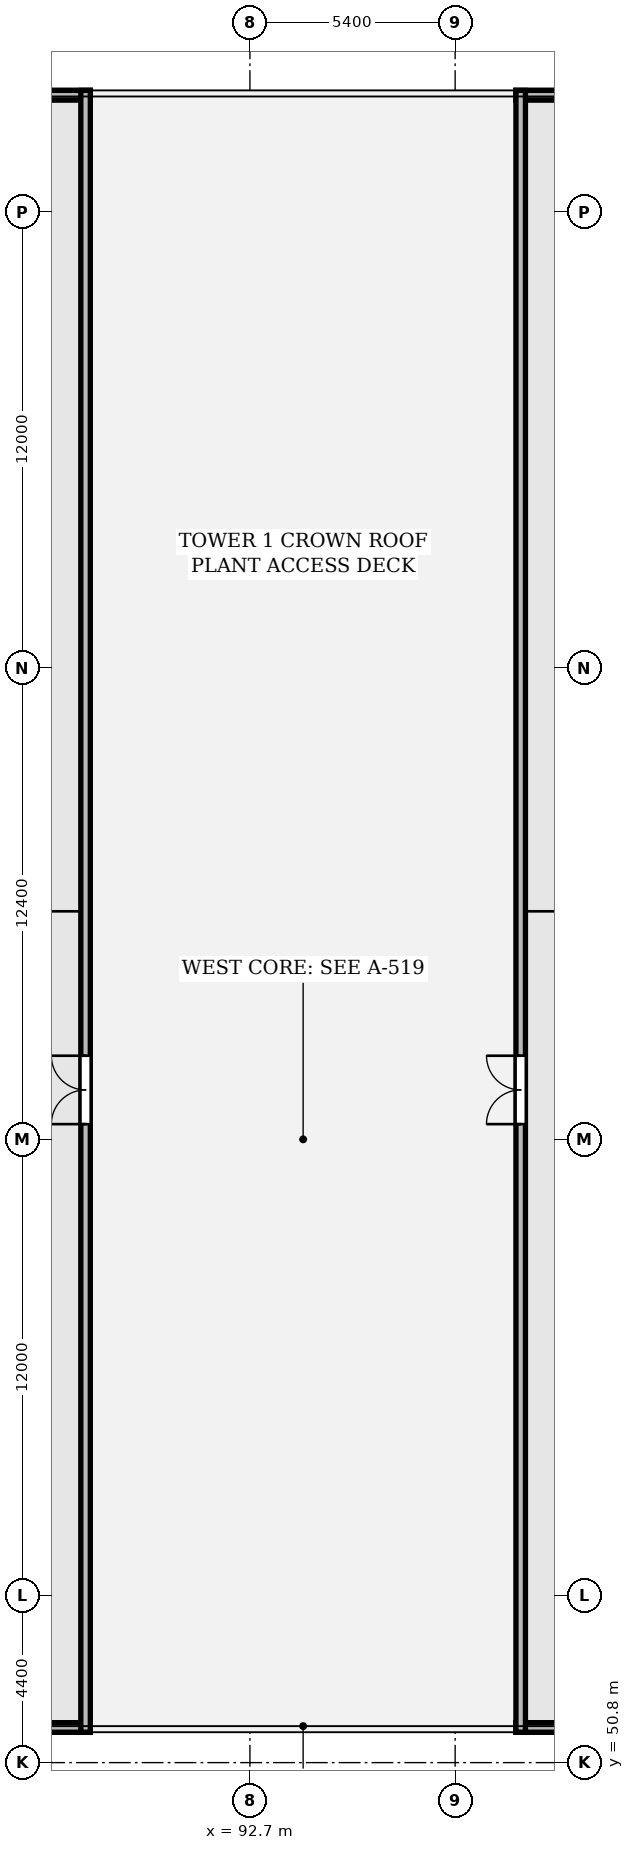
"""IFC4 building model, lengths in metres.
Left out: names, types, materials, properties, quantities, classifications, styles, units other than length and angle.
Written with IfcOpenShell. Run it as: python <this file> out.ifc"""

import sys

from ifc_helpers import new_model, si_unit, direction, frame, frame_2d, origin, place, context, subcontext, project, spatial, rectangle, extrude, element, fill, save


model = new_model("IFC4")
c1 = context("Model", 3, precision=1e-05, world=origin(), true_north=direction((0.0, 1.0)))
c2 = subcontext(c1, "Body", "Model", "MODEL_VIEW")
j1 = project(units=[si_unit("LENGTHUNIT", "METRE"), si_unit("PLANEANGLEUNIT", "RADIAN")], contexts=[c1])
p1 = place(None, origin())
s1 = spatial("IfcSite", under=j1, at=p1, CompositionType="ELEMENT")
p2 = place(p1, origin())
s2 = spatial("IfcBuilding", under=s1, at=p2, CompositionType="ELEMENT")
p3 = place(p2, frame((0.0, 0.0, 264.2)))
s3 = spatial("IfcBuildingStorey", under=s2, at=p3, CompositionType="ELEMENT", Elevation=264.2)
p4 = place(p3, frame((56.2, 51.725, 0.0), z_axis=(0.0, 0.0, 1.0), x_axis=(1.0, 0.0, 0.0)))
e1 = element("IfcWall", 1, at=p4, inside=s3, PredefinedType="SHEAR", context=c2, shape_type="SweptSolid", body=[
    extrude(rectangle(XDim=32.3, YDim=0.25, at=frame_2d((16.15, 0.0))), origin(), (0.0, 0.0, 1.0), 8.15),
])
p5 = place(p3, frame((85.5, 51.725, 8.15), z_axis=(0.0, 0.0, 1.0), x_axis=(1.0, 0.0, 0.0)))
e2 = element("IfcWall", 2, at=p5, inside=s3, PredefinedType="SHEAR", context=c2, shape_type="SweptSolid", body=[
    extrude(rectangle(XDim=3.0, YDim=0.25, at=frame_2d((1.5, 0.0))), origin(), (0.0, 0.0, 1.0), 3.8),
])
p6 = place(p3, frame((88.5, 94.675, 0.0), z_axis=(0.0, 0.0, 1.0), x_axis=(-1.0, 0.0, 0.0)))
e3 = element("IfcWall", 3, at=p6, inside=s3, PredefinedType="SHEAR", context=c2, shape_type="SweptSolid", body=[
    extrude(rectangle(XDim=32.3, YDim=0.25, at=frame_2d((16.15, 0.0))), origin(), (0.0, 0.0, 1.0), 8.15),
])
p7 = place(p3, frame((88.5, 94.675, 8.15), z_axis=(0.0, 0.0, 1.0), x_axis=(-1.0, 0.0, 0.0)))
e4 = element("IfcWall", 4, at=p7, inside=s3, PredefinedType="SHEAR", context=c2, shape_type="SweptSolid", body=[
    extrude(rectangle(XDim=3.0, YDim=0.25, at=frame_2d((1.5, 0.0))), origin(), (0.0, 0.0, 1.0), 3.8),
])
p8 = place(p3, frame((88.375, 51.6, 0.0), z_axis=(0.0, 0.0, 1.0), x_axis=(0.0, 1.0, 0.0)))
e5 = element("IfcWall", 5, at=p8, inside=s3, PredefinedType="SHEAR", context=c2, shape_type="SweptSolid", body=[
    extrude(rectangle(XDim=43.2, YDim=0.25, at=frame_2d((21.6, 0.0))), origin(), (0.0, 0.0, 1.0), 11.95),
])
p9 = place(p8, frame((16.0, 0.0, 0.0)))
e6 = element("IfcOpeningElement", 6, at=p9, cuts=e5, PredefinedType="OPENING", context=c2, shape_type="SweptSolid", body=[
    extrude(rectangle(XDim=1.8, YDim=2.2, at=frame_2d((0.9, 1.1))), frame((0.0, 0.135, 0.0), z_axis=(0.0, -1.0, 0.0), x_axis=(1.0, 0.0, 0.0)), (0.0, 0.0, 1.0), 0.27),
])
p10 = place(p3, frame((99.7, 51.725, 0.0), z_axis=(0.0, 0.0, 1.0), x_axis=(1.0, 0.0, 0.0)))
e7 = element("IfcWall", 7, at=p10, inside=s3, PredefinedType="SHEAR", context=c2, shape_type="SweptSolid", body=[
    extrude(rectangle(XDim=32.3, YDim=0.25, at=frame_2d((16.15, 0.0))), origin(), (0.0, 0.0, 1.0), 12.95),
])
p11 = place(p3, frame((99.7, 51.725, 12.95), z_axis=(0.0, 0.0, 1.0), x_axis=(1.0, 0.0, 0.0)))
e8 = element("IfcWall", 8, at=p11, inside=s3, PredefinedType="SHEAR", context=c2, shape_type="SweptSolid", body=[
    extrude(rectangle(XDim=3.0, YDim=0.25, at=frame_2d((1.5, 0.0))), origin(), (0.0, 0.0, 1.0), 3.8),
])
p12 = place(p3, frame((132.0, 94.675, 0.0), z_axis=(0.0, 0.0, 1.0), x_axis=(-1.0, 0.0, 0.0)))
e9 = element("IfcWall", 9, at=p12, inside=s3, PredefinedType="SHEAR", context=c2, shape_type="SweptSolid", body=[
    extrude(rectangle(XDim=32.3, YDim=0.25, at=frame_2d((16.15, 0.0))), origin(), (0.0, 0.0, 1.0), 12.95),
])
p13 = place(p3, frame((102.7, 94.675, 12.95), z_axis=(0.0, 0.0, 1.0), x_axis=(-1.0, 0.0, 0.0)))
e10 = element("IfcWall", 10, at=p13, inside=s3, PredefinedType="SHEAR", context=c2, shape_type="SweptSolid", body=[
    extrude(rectangle(XDim=3.0, YDim=0.25, at=frame_2d((1.5, 0.0))), origin(), (0.0, 0.0, 1.0), 3.8),
])
p14 = place(p3, frame((99.825, 51.6, 0.0), z_axis=(0.0, 0.0, 1.0), x_axis=(0.0, 1.0, 0.0)))
e11 = element("IfcWall", 11, at=p14, inside=s3, PredefinedType="SHEAR", context=c2, shape_type="SweptSolid", body=[
    extrude(rectangle(XDim=43.2, YDim=0.25, at=frame_2d((21.6, 0.0))), origin(), (0.0, 0.0, 1.0), 16.75),
])
p15 = place(p14, frame((16.0, 0.0, 0.0)))
e12 = element("IfcOpeningElement", 12, at=p15, cuts=e11, PredefinedType="OPENING", context=c2, shape_type="SweptSolid", body=[
    extrude(rectangle(XDim=1.8, YDim=2.2, at=frame_2d((0.9, 1.1))), frame((0.0, 0.135, 0.0), z_axis=(0.0, -1.0, 0.0), x_axis=(1.0, 0.0, 0.0)), (0.0, 0.0, 1.0), 0.27),
])
p16 = place(p9, origin())
e13 = element("IfcDoor", 13, at=p16, inside=s3, OperationType="DOUBLE_DOOR_SINGLE_SWING", PredefinedType="DOOR", context=c2, shape_type="SweptSolid", body=[
    extrude(rectangle(XDim=1.8, YDim=2.2, at=frame_2d((0.9, 1.1))), frame((0.0, 0.025, 0.0), z_axis=(0.0, -1.0, 0.0), x_axis=(1.0, 0.0, 0.0)), (0.0, 0.0, 1.0), 0.05),
])
fill(e6, e13)
p17 = place(p15, origin())
e14 = element("IfcDoor", 14, at=p17, inside=s3, OperationType="DOUBLE_DOOR_SINGLE_SWING", PredefinedType="DOOR", context=c2, shape_type="SweptSolid", body=[
    extrude(rectangle(XDim=1.8, YDim=2.2, at=frame_2d((0.9, 1.1))), frame((0.0, 0.025, 0.0), z_axis=(0.0, -1.0, 0.0), x_axis=(1.0, 0.0, 0.0)), (0.0, 0.0, 1.0), 0.05),
])
fill(e12, e14)
save(model, sys.argv[1])
